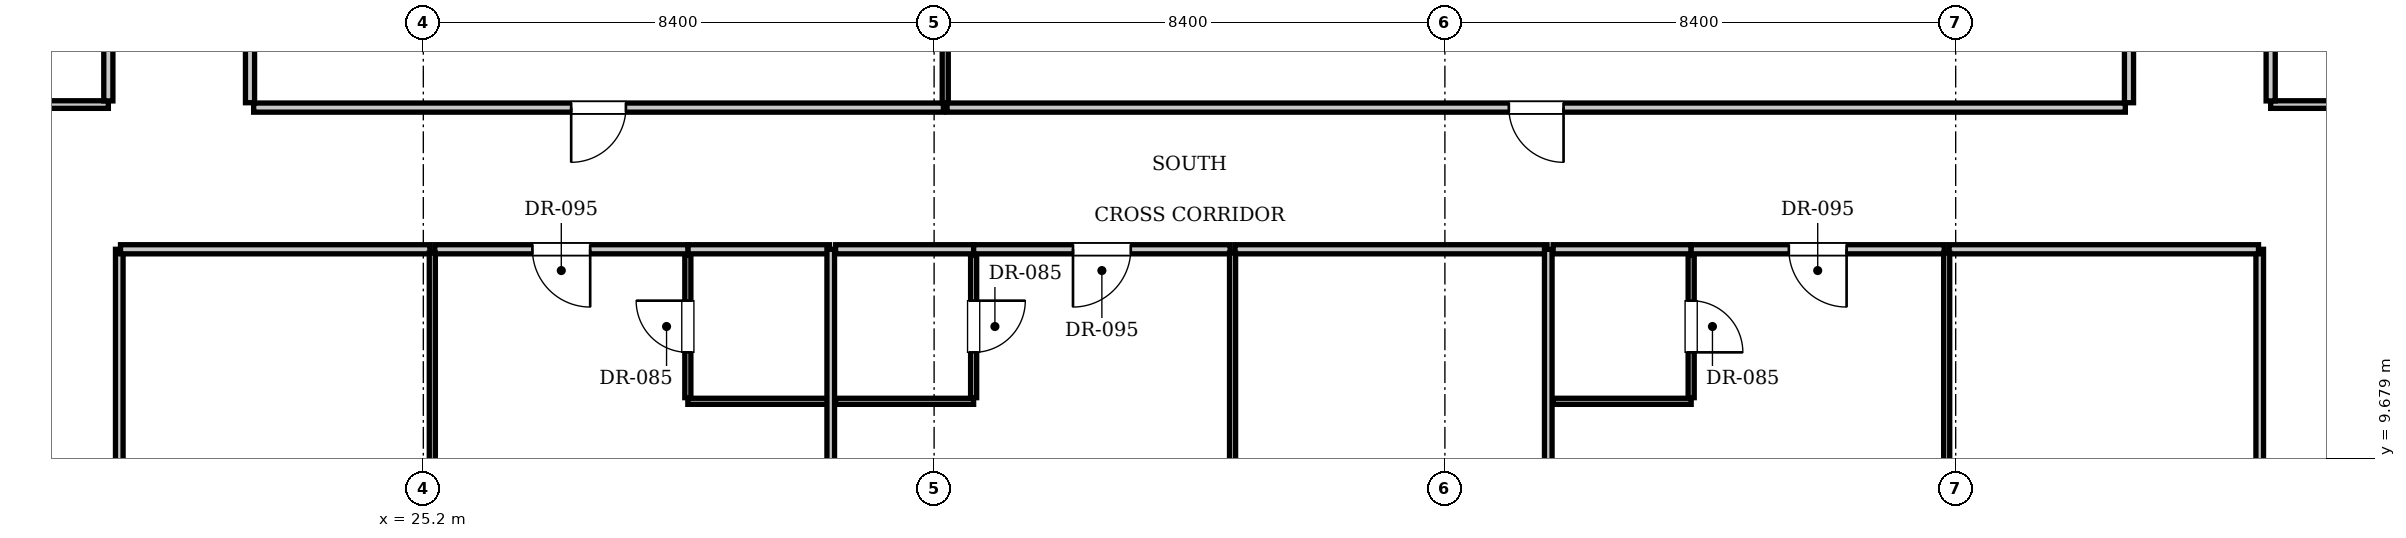
"""IFC4 building model, lengths in metres.
Left out: names, types, materials, properties, quantities, classifications, styles, units other than length and angle.
Written with IfcOpenShell. Run it as: python <this file> out.ifc"""

import sys

from ifc_helpers import new_model, si_unit, direction, frame, frame_2d, origin, place, context, subcontext, project, spatial, rectangle, extrude, element, fill, save


model = new_model("IFC4")
c1 = context("Model", 3, precision=1e-05, world=origin(), true_north=direction((0.0, 1.0)))
c2 = subcontext(c1, "Body", "Model", "MODEL_VIEW")
j1 = project(units=[si_unit("LENGTHUNIT", "METRE"), si_unit("PLANEANGLEUNIT", "RADIAN")], contexts=[c1])
p1 = place(None, origin())
s1 = spatial("IfcSite", under=j1, at=p1, CompositionType="ELEMENT")
p2 = place(p1, origin())
s2 = spatial("IfcBuilding", under=s1, at=p2, CompositionType="ELEMENT")
p3 = place(p2, frame((0.0, 0.0, 65.45)))
s3 = spatial("IfcBuildingStorey", under=s2, at=p3, CompositionType="ELEMENT", Elevation=65.45)
for number, where, z_axis, x_axis in (
    (1, (22.35, 15.53, 0.0), (0.0, 0.0, 1.0), (0.0, 1.0, 0.0)),
    (2, (53.25, 15.53, 0.0), (0.0, 0.0, 1.0), (0.0, 1.0, 0.0)),
):
    element("IfcWall", number, at=place(p3, frame(where, z_axis=z_axis, x_axis=x_axis)), inside=s3, PredefinedType="PARTITIONING", context=c2, shape_type="SweptSolid", body=[
        extrude(rectangle(XDim=8.34, YDim=0.15, at=frame_2d((4.17, 0.0))), origin(), (0.0, 0.0, 1.0), 3.61),
    ])
p4 = place(p3, frame((22.41, 15.45, 0.0), z_axis=(0.0, 0.0, 1.0), x_axis=(1.0, 0.0, 0.0)))
e3 = element("IfcWall", 3, at=p4, inside=s3, PredefinedType="PARTITIONING", context=c2, shape_type="SweptSolid", body=[
    extrude(rectangle(XDim=11.343, YDim=0.15, at=frame_2d((5.671, 0.0))), origin(), (0.0, 0.0, 1.0), 3.61),
])
p5 = place(p4, frame((5.221, 0.0, 0.0)))
e4 = element("IfcOpeningElement", 4, at=p5, cuts=e3, PredefinedType="OPENING", context=c2, shape_type="SweptSolid", body=[
    extrude(rectangle(XDim=0.9, YDim=2.1, at=frame_2d((0.45, 1.05))), frame((0.0, 0.085, 0.0), z_axis=(0.0, -1.0, 0.0), x_axis=(1.0, 0.0, 0.0)), (0.0, 0.0, 1.0), 0.17),
])
p6 = place(p3, frame((33.783, 15.53, 0.0), z_axis=(0.0, 0.0, 1.0), x_axis=(0.0, 1.0, 0.0)))
e5 = element("IfcWall", 5, at=p6, inside=s3, PredefinedType="PARTITIONING", context=c2, shape_type="SweptSolid", body=[
    extrude(rectangle(XDim=8.34, YDim=0.1, at=frame_2d((4.17, 0.0))), origin(), (0.0, 0.0, 1.0), 2.988),
])
p7 = place(p3, frame((33.813, 15.45, 0.0), z_axis=(0.0, 0.0, 1.0), x_axis=(1.0, 0.0, 0.0)))
e6 = element("IfcWall", 6, at=p7, inside=s3, PredefinedType="PARTITIONING", context=c2, shape_type="SweptSolid", body=[
    extrude(rectangle(XDim=19.377, YDim=0.15, at=frame_2d((9.688, 0.0))), origin(), (0.0, 0.0, 1.0), 3.61),
])
p8 = place(p7, frame((9.239, 0.0, 0.0)))
e7 = element("IfcOpeningElement", 7, at=p8, cuts=e6, PredefinedType="OPENING", context=c2, shape_type="SweptSolid", body=[
    extrude(rectangle(XDim=0.9, YDim=2.1, at=frame_2d((0.45, 1.05))), frame((0.0, 0.085, 0.0), z_axis=(0.0, -1.0, 0.0), x_axis=(1.0, 0.0, 0.0)), (0.0, 0.0, 1.0), 0.17),
])
for number, where, z_axis, x_axis in (
    (8, (20.2, 0.1, 0.0), (0.0, 0.0, 1.0), (0.0, 1.0, 0.0)),
    (9, (55.4, 0.1, 0.0), (0.0, 0.0, 1.0), (0.0, 1.0, 0.0)),
):
    element("IfcWall", number, at=place(p3, frame(where, z_axis=z_axis, x_axis=x_axis)), inside=s3, PredefinedType="PARTITIONING", context=c2, shape_type="SweptSolid", body=[
        extrude(rectangle(XDim=13.02, YDim=0.125, at=frame_2d((6.51, 0.0))), origin(), (0.0, 0.0, 1.0), 3.61),
    ])
p9 = place(p3, frame((29.55, 13.12, 0.0), z_axis=(0.0, 0.0, 1.0), x_axis=(1.0, 0.0, 0.0)))
e10 = element("IfcWall", 10, at=p9, inside=s3, PredefinedType="PARTITIONING", context=c2, shape_type="SweptSolid", body=[
    extrude(rectangle(XDim=2.33, YDim=0.15, at=frame_2d((1.165, 0.0))), origin(), (0.0, 0.0, 1.0), 3.61),
])
p10 = place(p3, frame((29.55, 10.62, 0.0), z_axis=(0.0, 0.0, 1.0), x_axis=(1.0, 0.0, 0.0)))
e11 = element("IfcWall", 11, at=p10, inside=s3, PredefinedType="PARTITIONING", context=c2, shape_type="SweptSolid", body=[
    extrude(rectangle(XDim=2.31, YDim=0.1, at=frame_2d((1.155, 0.0))), origin(), (0.0, 0.0, 1.0), 3.61),
])
p11 = place(p3, frame((29.55, 10.68, 0.0), z_axis=(0.0, 0.0, 1.0), x_axis=(0.0, 1.0, 0.0)))
e12 = element("IfcWall", 12, at=p11, inside=s3, PredefinedType="PARTITIONING", context=c2, shape_type="SweptSolid", body=[
    extrude(rectangle(XDim=2.34, YDim=0.1, at=frame_2d((1.17, 0.0))), origin(), (0.0, 0.0, 1.0), 3.61),
])
p12 = place(p11, frame((0.745, 0.0, 0.0)))
e13 = element("IfcOpeningElement", 13, at=p12, cuts=e12, PredefinedType="OPENING", context=c2, shape_type="SweptSolid", body=[
    extrude(rectangle(XDim=0.85, YDim=2.1, at=frame_2d((0.425, 1.05))), frame((0.0, 0.06, 0.0), z_axis=(0.0, -1.0, 0.0), x_axis=(1.0, 0.0, 0.0)), (0.0, 0.0, 1.0), 0.12),
])
p13 = place(p3, frame((20.22, 13.12, 0.0), z_axis=(0.0, 0.0, 1.0), x_axis=(1.0, 0.0, 0.0)))
e14 = element("IfcWall", 14, at=p13, inside=s3, PredefinedType="PARTITIONING", context=c2, shape_type="SweptSolid", body=[
    extrude(rectangle(XDim=5.088, YDim=0.15, at=frame_2d((2.544, 0.0))), origin(), (0.0, 0.0, 1.0), 3.61),
])
p14 = place(p3, frame((25.388, 13.12, 0.0), z_axis=(0.0, 0.0, 1.0), x_axis=(1.0, 0.0, 0.0)))
e15 = element("IfcWall", 15, at=p14, inside=s3, PredefinedType="PARTITIONING", context=c2, shape_type="SweptSolid", body=[
    extrude(rectangle(XDim=4.162, YDim=0.15, at=frame_2d((2.081, 0.0))), origin(), (0.0, 0.0, 1.0), 3.61),
])
p15 = place(p14, frame((1.606, 0.0, 0.0)))
e16 = element("IfcOpeningElement", 16, at=p15, cuts=e15, PredefinedType="OPENING", context=c2, shape_type="SweptSolid", body=[
    extrude(rectangle(XDim=0.95, YDim=2.15, at=frame_2d((0.475, 1.075))), frame((0.0, 0.085, 0.0), z_axis=(0.0, -1.0, 0.0), x_axis=(1.0, 0.0, 0.0)), (0.0, 0.0, 1.0), 0.17),
])
p16 = place(p3, frame((25.348, 0.03, 0.0), z_axis=(0.0, 0.0, 1.0), x_axis=(0.0, 1.0, 0.0)))
e17 = element("IfcWall", 17, at=p16, inside=s3, PredefinedType="PARTITIONING", context=c2, shape_type="SweptSolid", body=[
    extrude(rectangle(XDim=13.03, YDim=0.1, at=frame_2d((6.515, 0.0))), origin(), (0.0, 0.0, 1.0), 2.988),
])
p17 = place(p16, frame((1.6, 0.0, 0.0)))
e18 = element("IfcOpeningElement", 18, at=p17, cuts=e17, PredefinedType="OPENING", context=c2, shape_type="SweptSolid", body=[
    extrude(rectangle(XDim=0.9, YDim=2.1, at=frame_2d((0.45, 1.05))), frame((0.0, 0.06, 0.0), z_axis=(0.0, -1.0, 0.0), x_axis=(1.0, 0.0, 0.0)), (0.0, 0.0, 1.0), 0.12),
])
p18 = place(p3, frame((31.9, 0.1, 0.0), z_axis=(0.0, 0.0, 1.0), x_axis=(0.0, 1.0, 0.0)))
e19 = element("IfcWall", 19, at=p18, inside=s3, PredefinedType="PARTITIONING", context=c2, shape_type="SweptSolid", body=[
    extrude(rectangle(XDim=13.02, YDim=0.125, at=frame_2d((6.51, 0.0))), origin(), (0.0, 0.0, 1.0), 3.61),
])
p19 = place(p3, frame((31.98, 13.12, 0.0), z_axis=(0.0, 0.0, 1.0), x_axis=(1.0, 0.0, 0.0)))
e20 = element("IfcWall", 20, at=p19, inside=s3, PredefinedType="PARTITIONING", context=c2, shape_type="SweptSolid", body=[
    extrude(rectangle(XDim=2.27, YDim=0.15, at=frame_2d((1.135, 0.0))), origin(), (0.0, 0.0, 1.0), 3.61),
])
p20 = place(p3, frame((31.98, 10.62, 0.0), z_axis=(0.0, 0.0, 1.0), x_axis=(1.0, 0.0, 0.0)))
e21 = element("IfcWall", 21, at=p20, inside=s3, PredefinedType="PARTITIONING", context=c2, shape_type="SweptSolid", body=[
    extrude(rectangle(XDim=2.27, YDim=0.1, at=frame_2d((1.135, 0.0))), origin(), (0.0, 0.0, 1.0), 3.61),
])
p21 = place(p3, frame((34.25, 10.68, 0.0), z_axis=(0.0, 0.0, 1.0), x_axis=(0.0, 1.0, 0.0)))
e22 = element("IfcWall", 22, at=p21, inside=s3, PredefinedType="PARTITIONING", context=c2, shape_type="SweptSolid", body=[
    extrude(rectangle(XDim=2.34, YDim=0.1, at=frame_2d((1.17, 0.0))), origin(), (0.0, 0.0, 1.0), 3.61),
])
p22 = place(p21, frame((0.745, 0.0, 0.0)))
e23 = element("IfcOpeningElement", 23, at=p22, cuts=e22, PredefinedType="OPENING", context=c2, shape_type="SweptSolid", body=[
    extrude(rectangle(XDim=0.85, YDim=2.1, at=frame_2d((0.425, 1.05))), frame((0.0, 0.06, 0.0), z_axis=(0.0, -1.0, 0.0), x_axis=(1.0, 0.0, 0.0)), (0.0, 0.0, 1.0), 0.12),
])
p23 = place(p3, frame((34.25, 13.12, 0.0), z_axis=(0.0, 0.0, 1.0), x_axis=(1.0, 0.0, 0.0)))
e24 = element("IfcWall", 24, at=p23, inside=s3, PredefinedType="PARTITIONING", context=c2, shape_type="SweptSolid", body=[
    extrude(rectangle(XDim=4.218, YDim=0.15, at=frame_2d((2.109, 0.0))), origin(), (0.0, 0.0, 1.0), 3.61),
])
p24 = place(p23, frame((1.634, 0.0, 0.0)))
e25 = element("IfcOpeningElement", 25, at=p24, cuts=e24, PredefinedType="OPENING", context=c2, shape_type="SweptSolid", body=[
    extrude(rectangle(XDim=0.95, YDim=2.15, at=frame_2d((0.475, 1.075))), frame((0.0, 0.085, 0.0), z_axis=(0.0, -1.0, 0.0), x_axis=(1.0, 0.0, 0.0)), (0.0, 0.0, 1.0), 0.17),
])
p25 = place(p3, frame((38.548, 13.12, 0.0), z_axis=(0.0, 0.0, 1.0), x_axis=(1.0, 0.0, 0.0)))
e26 = element("IfcWall", 26, at=p25, inside=s3, PredefinedType="PARTITIONING", context=c2, shape_type="SweptSolid", body=[
    extrude(rectangle(XDim=5.132, YDim=0.15, at=frame_2d((2.566, 0.0))), origin(), (0.0, 0.0, 1.0), 3.61),
])
p26 = place(p3, frame((38.508, 0.03, 0.0), z_axis=(0.0, 0.0, 1.0), x_axis=(0.0, 1.0, 0.0)))
e27 = element("IfcWall", 27, at=p26, inside=s3, PredefinedType="PARTITIONING", context=c2, shape_type="SweptSolid", body=[
    extrude(rectangle(XDim=13.03, YDim=0.1, at=frame_2d((6.515, 0.0))), origin(), (0.0, 0.0, 1.0), 3.61),
])
p27 = place(p26, frame((1.6, 0.0, 0.0)))
e28 = element("IfcOpeningElement", 28, at=p27, cuts=e27, PredefinedType="OPENING", context=c2, shape_type="SweptSolid", body=[
    extrude(rectangle(XDim=0.9, YDim=2.1, at=frame_2d((0.45, 1.05))), frame((0.0, 0.06, 0.0), z_axis=(0.0, -1.0, 0.0), x_axis=(1.0, 0.0, 0.0)), (0.0, 0.0, 1.0), 0.12),
])
p28 = place(p3, frame((43.7, 0.1, 0.0), z_axis=(0.0, 0.0, 1.0), x_axis=(0.0, 1.0, 0.0)))
e29 = element("IfcWall", 29, at=p28, inside=s3, PredefinedType="PARTITIONING", context=c2, shape_type="SweptSolid", body=[
    extrude(rectangle(XDim=13.02, YDim=0.125, at=frame_2d((6.51, 0.0))), origin(), (0.0, 0.0, 1.0), 3.61),
])
p29 = place(p3, frame((43.78, 13.12, 0.0), z_axis=(0.0, 0.0, 1.0), x_axis=(1.0, 0.0, 0.0)))
e30 = element("IfcWall", 30, at=p29, inside=s3, PredefinedType="PARTITIONING", context=c2, shape_type="SweptSolid", body=[
    extrude(rectangle(XDim=2.27, YDim=0.15, at=frame_2d((1.135, 0.0))), origin(), (0.0, 0.0, 1.0), 3.61),
])
p30 = place(p3, frame((43.78, 10.62, 0.0), z_axis=(0.0, 0.0, 1.0), x_axis=(1.0, 0.0, 0.0)))
e31 = element("IfcWall", 31, at=p30, inside=s3, PredefinedType="PARTITIONING", context=c2, shape_type="SweptSolid", body=[
    extrude(rectangle(XDim=2.27, YDim=0.1, at=frame_2d((1.135, 0.0))), origin(), (0.0, 0.0, 1.0), 3.61),
])
p31 = place(p3, frame((46.05, 10.68, 0.0), z_axis=(0.0, 0.0, 1.0), x_axis=(0.0, 1.0, 0.0)))
e32 = element("IfcWall", 32, at=p31, inside=s3, PredefinedType="PARTITIONING", context=c2, shape_type="SweptSolid", body=[
    extrude(rectangle(XDim=2.34, YDim=0.1, at=frame_2d((1.17, 0.0))), origin(), (0.0, 0.0, 1.0), 3.61),
])
p32 = place(p31, frame((0.745, 0.0, 0.0)))
e33 = element("IfcOpeningElement", 33, at=p32, cuts=e32, PredefinedType="OPENING", context=c2, shape_type="SweptSolid", body=[
    extrude(rectangle(XDim=0.85, YDim=2.1, at=frame_2d((0.425, 1.05))), frame((0.0, 0.06, 0.0), z_axis=(0.0, -1.0, 0.0), x_axis=(1.0, 0.0, 0.0)), (0.0, 0.0, 1.0), 0.12),
])
p33 = place(p3, frame((46.05, 13.12, 0.0), z_axis=(0.0, 0.0, 1.0), x_axis=(1.0, 0.0, 0.0)))
e34 = element("IfcWall", 34, at=p33, inside=s3, PredefinedType="PARTITIONING", context=c2, shape_type="SweptSolid", body=[
    extrude(rectangle(XDim=4.162, YDim=0.15, at=frame_2d((2.081, 0.0))), origin(), (0.0, 0.0, 1.0), 3.61),
])
p34 = place(p33, frame((1.606, 0.0, 0.0)))
e35 = element("IfcOpeningElement", 35, at=p34, cuts=e34, PredefinedType="OPENING", context=c2, shape_type="SweptSolid", body=[
    extrude(rectangle(XDim=0.95, YDim=2.15, at=frame_2d((0.475, 1.075))), frame((0.0, 0.085, 0.0), z_axis=(0.0, -1.0, 0.0), x_axis=(1.0, 0.0, 0.0)), (0.0, 0.0, 1.0), 0.17),
])
p35 = place(p3, frame((50.292, 13.12, 0.0), z_axis=(0.0, 0.0, 1.0), x_axis=(1.0, 0.0, 0.0)))
e36 = element("IfcWall", 36, at=p35, inside=s3, PredefinedType="PARTITIONING", context=c2, shape_type="SweptSolid", body=[
    extrude(rectangle(XDim=5.088, YDim=0.15, at=frame_2d((2.544, 0.0))), origin(), (0.0, 0.0, 1.0), 3.61),
])
p36 = place(p3, frame((50.252, 0.03, 0.0), z_axis=(0.0, 0.0, 1.0), x_axis=(0.0, 1.0, 0.0)))
e37 = element("IfcWall", 37, at=p36, inside=s3, PredefinedType="PARTITIONING", context=c2, shape_type="SweptSolid", body=[
    extrude(rectangle(XDim=13.03, YDim=0.1, at=frame_2d((6.515, 0.0))), origin(), (0.0, 0.0, 1.0), 2.988),
])
p37 = place(p36, frame((1.6, 0.0, 0.0)))
e38 = element("IfcOpeningElement", 38, at=p37, cuts=e37, PredefinedType="OPENING", context=c2, shape_type="SweptSolid", body=[
    extrude(rectangle(XDim=0.9, YDim=2.1, at=frame_2d((0.45, 1.05))), frame((0.0, 0.06, 0.0), z_axis=(0.0, -1.0, 0.0), x_axis=(1.0, 0.0, 0.0)), (0.0, 0.0, 1.0), 0.12),
])
p38 = place(p3, frame((10.9, 15.5, 0.0), z_axis=(0.0, 0.0, 1.0), x_axis=(1.0, 0.0, 0.0)))
e39 = element("IfcWall", 39, at=p38, inside=s3, PredefinedType="PARTITIONING", context=c2, shape_type="SweptSolid", body=[
    extrude(rectangle(XDim=9.12, YDim=0.125, at=frame_2d((4.56, 0.0))), origin(), (0.0, 0.0, 1.0), 3.61),
])
p39 = place(p3, frame((55.58, 15.5, 0.0), z_axis=(0.0, 0.0, 1.0), x_axis=(1.0, 0.0, 0.0)))
e40 = element("IfcWall", 40, at=p39, inside=s3, PredefinedType="PARTITIONING", context=c2, shape_type="SweptSolid", body=[
    extrude(rectangle(XDim=9.12, YDim=0.125, at=frame_2d((4.56, 0.0))), origin(), (0.0, 0.0, 1.0), 3.61),
])
p40 = place(p3, frame((20.02, 15.56, 0.0), z_axis=(0.0, 0.0, 1.0), x_axis=(0.0, 1.0, 0.0)))
e41 = element("IfcWall", 41, at=p40, inside=s3, PredefinedType="PARTITIONING", context=c2, shape_type="SweptSolid", body=[
    extrude(rectangle(XDim=6.14, YDim=0.15, at=frame_2d((3.07, 0.0))), origin(), (0.0, 0.0, 1.0), 3.61),
])
p41 = place(p40, frame((2.595, 0.0, 0.0)))
e42 = element("IfcOpeningElement", 42, at=p41, cuts=e41, PredefinedType="OPENING", context=c2, shape_type="SweptSolid", body=[
    extrude(rectangle(XDim=0.95, YDim=2.15, at=frame_2d((0.475, 1.075))), frame((0.0, 0.085, 0.0), z_axis=(0.0, -1.0, 0.0), x_axis=(1.0, 0.0, 0.0)), (0.0, 0.0, 1.0), 0.17),
])
p42 = place(p3, frame((55.58, 15.56, 0.0), z_axis=(0.0, 0.0, 1.0), x_axis=(0.0, 1.0, 0.0)))
e43 = element("IfcWall", 43, at=p42, inside=s3, PredefinedType="PARTITIONING", context=c2, shape_type="SweptSolid", body=[
    extrude(rectangle(XDim=6.14, YDim=0.15, at=frame_2d((3.07, 0.0))), origin(), (0.0, 0.0, 1.0), 3.61),
])
p43 = place(p42, frame((2.595, 0.0, 0.0)))
e44 = element("IfcOpeningElement", 44, at=p43, cuts=e43, PredefinedType="OPENING", context=c2, shape_type="SweptSolid", body=[
    extrude(rectangle(XDim=0.95, YDim=2.15, at=frame_2d((0.475, 1.075))), frame((0.0, 0.085, 0.0), z_axis=(0.0, -1.0, 0.0), x_axis=(1.0, 0.0, 0.0)), (0.0, 0.0, 1.0), 0.17),
])
p44 = place(p5, frame((0.9, 0.0, 0.0), z_axis=(0.0, 0.0, 1.0), x_axis=(-1.0, 0.0, 0.0)))
e45 = element("IfcDoor", 45, at=p44, inside=s3, OperationType="SINGLE_SWING_RIGHT", PredefinedType="DOOR", context=c2, shape_type="SweptSolid", body=[
    extrude(rectangle(XDim=0.9, YDim=2.1, at=frame_2d((0.45, 1.05))), frame((0.0, 0.025, 0.0), z_axis=(0.0, -1.0, 0.0), x_axis=(1.0, 0.0, 0.0)), (0.0, 0.0, 1.0), 0.05),
])
fill(e4, e45)
p45 = place(p8, frame((0.9, 0.0, 0.0), z_axis=(0.0, 0.0, 1.0), x_axis=(-1.0, 0.0, 0.0)))
e46 = element("IfcDoor", 46, at=p45, inside=s3, OperationType="SINGLE_SWING_LEFT", PredefinedType="DOOR", context=c2, shape_type="SweptSolid", body=[
    extrude(rectangle(XDim=0.9, YDim=2.1, at=frame_2d((0.45, 1.05))), frame((0.0, 0.025, 0.0), z_axis=(0.0, -1.0, 0.0), x_axis=(1.0, 0.0, 0.0)), (0.0, 0.0, 1.0), 0.05),
])
fill(e7, e46)
p46 = place(p12, origin())
e47 = element("IfcDoor", 47, at=p46, inside=s3, OperationType="SINGLE_SWING_RIGHT", PredefinedType="DOOR", context=c2, shape_type="SweptSolid", body=[
    extrude(rectangle(XDim=0.85, YDim=2.1, at=frame_2d((0.425, 1.05))), frame((0.0, 0.025, 0.0), z_axis=(0.0, -1.0, 0.0), x_axis=(1.0, 0.0, 0.0)), (0.0, 0.0, 1.0), 0.05),
])
fill(e13, e47)
p47 = place(p15, frame((0.95, 0.0, 0.0), z_axis=(0.0, 0.0, 1.0), x_axis=(-1.0, 0.0, 0.0)))
e48 = element("IfcDoor", 48, at=p47, inside=s3, OperationType="SINGLE_SWING_LEFT", PredefinedType="DOOR", context=c2, shape_type="SweptSolid", body=[
    extrude(rectangle(XDim=0.95, YDim=2.15, at=frame_2d((0.475, 1.075))), frame((0.0, 0.025, 0.0), z_axis=(0.0, -1.0, 0.0), x_axis=(1.0, 0.0, 0.0)), (0.0, 0.0, 1.0), 0.05),
])
fill(e16, e48)
p48 = place(p22, frame((0.85, 0.0, 0.0), z_axis=(0.0, 0.0, 1.0), x_axis=(-1.0, 0.0, 0.0)))
e49 = element("IfcDoor", 49, at=p48, inside=s3, OperationType="SINGLE_SWING_LEFT", PredefinedType="DOOR", context=c2, shape_type="SweptSolid", body=[
    extrude(rectangle(XDim=0.85, YDim=2.1, at=frame_2d((0.425, 1.05))), frame((0.0, 0.025, 0.0), z_axis=(0.0, -1.0, 0.0), x_axis=(1.0, 0.0, 0.0)), (0.0, 0.0, 1.0), 0.05),
])
fill(e23, e49)
p49 = place(p24, frame((0.95, 0.0, 0.0), z_axis=(0.0, 0.0, 1.0), x_axis=(-1.0, 0.0, 0.0)))
e50 = element("IfcDoor", 50, at=p49, inside=s3, OperationType="SINGLE_SWING_RIGHT", PredefinedType="DOOR", context=c2, shape_type="SweptSolid", body=[
    extrude(rectangle(XDim=0.95, YDim=2.15, at=frame_2d((0.475, 1.075))), frame((0.0, 0.025, 0.0), z_axis=(0.0, -1.0, 0.0), x_axis=(1.0, 0.0, 0.0)), (0.0, 0.0, 1.0), 0.05),
])
fill(e25, e50)
p50 = place(p32, frame((0.85, 0.0, 0.0), z_axis=(0.0, 0.0, 1.0), x_axis=(-1.0, 0.0, 0.0)))
e51 = element("IfcDoor", 51, at=p50, inside=s3, OperationType="SINGLE_SWING_RIGHT", PredefinedType="DOOR", context=c2, shape_type="SweptSolid", body=[
    extrude(rectangle(XDim=0.85, YDim=2.1, at=frame_2d((0.425, 1.05))), frame((0.0, 0.025, 0.0), z_axis=(0.0, -1.0, 0.0), x_axis=(1.0, 0.0, 0.0)), (0.0, 0.0, 1.0), 0.05),
])
fill(e33, e51)
p51 = place(p34, frame((0.95, 0.0, 0.0), z_axis=(0.0, 0.0, 1.0), x_axis=(-1.0, 0.0, 0.0)))
e52 = element("IfcDoor", 52, at=p51, inside=s3, OperationType="SINGLE_SWING_LEFT", PredefinedType="DOOR", context=c2, shape_type="SweptSolid", body=[
    extrude(rectangle(XDim=0.95, YDim=2.15, at=frame_2d((0.475, 1.075))), frame((0.0, 0.025, 0.0), z_axis=(0.0, -1.0, 0.0), x_axis=(1.0, 0.0, 0.0)), (0.0, 0.0, 1.0), 0.05),
])
fill(e35, e52)
save(model, sys.argv[1])
